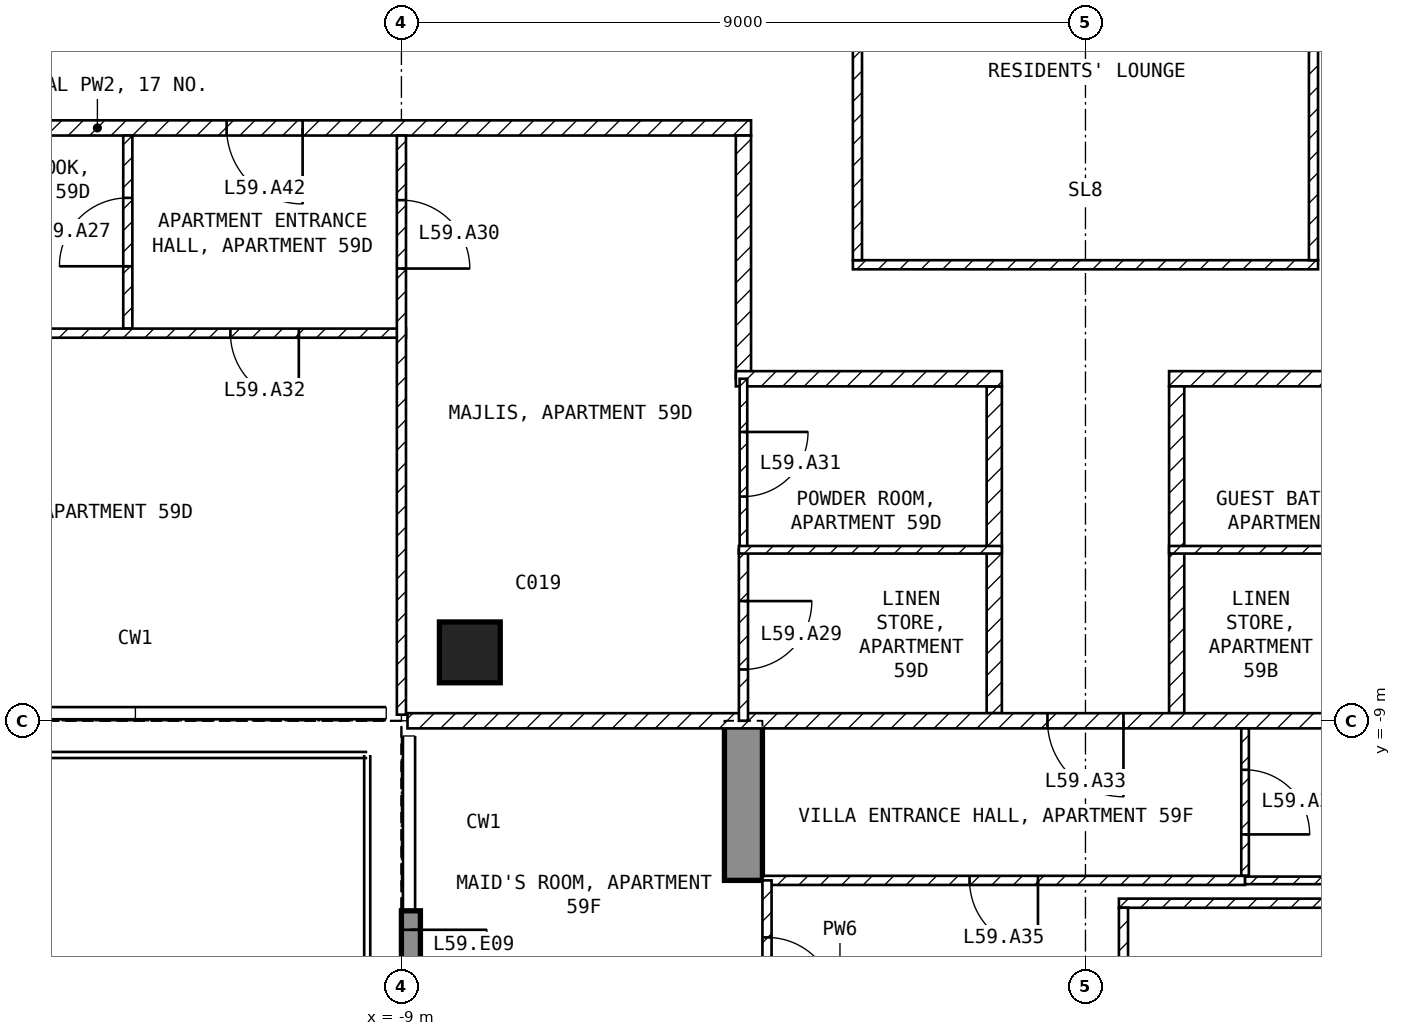
"""IFC4 building model, lengths in metres.
Left out: names, types, materials, properties, quantities, classifications, styles, units other than length and angle.
Written with IfcOpenShell. Run it as: python <this file> out.ifc"""

import sys

from ifc_helpers import new_model, si_unit, direction, frame, frame_2d, origin, origin_2d, place, context, subcontext, project, spatial, polyline, rectangle, outline, extrude, element, fill, save


model = new_model("IFC4")
c1 = context("Model", 3, precision=1e-05, world=origin(), true_north=direction((0.0, 1.0)))
c2 = subcontext(c1, "Body", "Model", "MODEL_VIEW")
j1 = project(units=[si_unit("LENGTHUNIT", "METRE"), si_unit("PLANEANGLEUNIT", "RADIAN")], contexts=[c1])
p1 = place(None, origin())
s1 = spatial("IfcSite", under=j1, at=p1, CompositionType="ELEMENT")
p2 = place(p1, origin())
s2 = spatial("IfcBuilding", under=s1, at=p2, CompositionType="ELEMENT")
p3 = place(p2, frame((0.0, 0.0, 236.0)))
s3 = spatial("IfcBuildingStorey", under=s2, at=p3, CompositionType="ELEMENT", Elevation=236.0)
p4 = place(p3, frame((-8.1, -8.1, -0.25), z_axis=(0.0, 0.0, 1.0), x_axis=(1.0, 0.0, 0.0)))
e1 = element("IfcColumn", 1, at=p4, inside=s3, PredefinedType="COLUMN", context=c2, shape_type="SweptSolid", body=[
    extrude(rectangle(XDim=0.8, YDim=0.8, at=origin_2d()), origin(), (0.0, 0.0, 1.0), 3.5),
])
p5 = place(p3, frame((-4.75, -16.7, -0.25), z_axis=(1.0, 0.0, 0.0), x_axis=(0.0, 1.0, 0.0)))
e2 = element("IfcWall", 2, at=p5, inside=s3, PredefinedType="SHEAR", context=c2, shape_type="SweptSolid", body=[
    extrude(outline(polyline([(0.0, 0.0), (3.2, 0.0), (3.2, 2.65), (5.6, 2.65), (5.6, 0.0), (7.7, 0.0), (7.7, 3.5), (0.0, 3.5), (0.0, 0.0)])), origin(), (0.0, 0.0, 1.0), 0.5),
])
p6 = place(p3, frame((-8.875, -11.5, 0.0), z_axis=(0.0, 0.0, 1.0), x_axis=(0.0, -1.0, 0.0)))
e3 = element("IfcWall", 3, at=p6, inside=s3, PredefinedType="SOLIDWALL", context=c2, shape_type="SweptSolid", body=[
    extrude(rectangle(XDim=2.7, YDim=0.25, at=frame_2d((1.35, 0.0))), origin(), (0.0, 0.0, 1.0), 3.25),
])
p7 = place(p6, frame((0.25, 0.0, 0.0)))
e4 = element("IfcOpeningElement", 4, at=p7, cuts=e3, PredefinedType="OPENING", context=c2, shape_type="SweptSolid", body=[
    extrude(rectangle(XDim=1.0, YDim=2.4, at=frame_2d((0.5, 1.2))), frame((0.0, 0.135, 0.0), z_axis=(0.0, -1.0, 0.0), x_axis=(1.0, 0.0, 0.0)), (0.0, 0.0, 1.0), 0.27),
])
p8 = place(p3, frame((-3.06, -3.0, 0.0), z_axis=(0.0, 0.0, 1.0), x_axis=(1.0, 0.0, 0.0)))
e5 = element("IfcWall", 5, at=p8, inside=s3, PredefinedType="PARTITIONING", context=c2, shape_type="SweptSolid", body=[
    extrude(rectangle(XDim=6.12, YDim=0.12, at=frame_2d((3.06, 0.0))), origin(), (0.0, 0.0, 1.0), 3.25),
])
for number, where, z_axis, x_axis in (
    (6, (3.0, -2.94, 0.0), (0.0, 0.0, 1.0), (0.0, 1.0, 0.0)),
    (7, (-3.0, 2.94, 0.0), (0.0, 0.0, 1.0), (0.0, -1.0, 0.0)),
):
    element("IfcWall", number, at=place(p3, frame(where, z_axis=z_axis, x_axis=x_axis)), inside=s3, PredefinedType="PARTITIONING", context=c2, shape_type="SweptSolid", body=[
        extrude(rectangle(XDim=5.88, YDim=0.12, at=frame_2d((2.94, 0.0))), origin(), (0.0, 0.0, 1.0), 3.25),
    ])
p9 = place(p3, frame((4.6, -4.5, 0.0), z_axis=(0.0, 0.0, 1.0), x_axis=(-1.0, 0.0, 0.0)))
e8 = element("IfcWall", 8, at=p9, inside=s3, PredefinedType="PARTITIONING", context=c2, shape_type="SweptSolid", body=[
    extrude(rectangle(XDim=3.5, YDim=0.2, at=frame_2d((1.75, 0.0))), origin(), (0.0, 0.0, 1.0), 3.25),
])
p10 = place(p3, frame((1.2, -4.6, 0.0), z_axis=(0.0, 0.0, 1.0), x_axis=(0.0, -1.0, 0.0)))
e9 = element("IfcWall", 9, at=p10, inside=s3, PredefinedType="PARTITIONING", context=c2, shape_type="SweptSolid", body=[
    extrude(rectangle(XDim=4.3, YDim=0.2, at=frame_2d((2.15, 0.0))), origin(), (0.0, 0.0, 1.0), 3.25),
])
p11 = place(p3, frame((-4.4, -1.2, 0.0), z_axis=(0.0, 0.0, 1.0), x_axis=(-1.0, 0.0, 0.0)))
e10 = element("IfcWall", 10, at=p11, inside=s3, PredefinedType="PARTITIONING", context=c2, shape_type="SweptSolid", body=[
    extrude(rectangle(XDim=17.2, YDim=0.2, at=frame_2d((8.6, 0.0))), origin(), (0.0, 0.0, 1.0), 3.25),
])
p12 = place(p11, frame((5.9, 0.0, 0.0)))
e11 = element("IfcOpeningElement", 11, at=p12, cuts=e10, PredefinedType="OPENING", context=c2, shape_type="SweptSolid", body=[
    extrude(rectangle(XDim=1.0, YDim=2.1, at=frame_2d((0.5, 1.05))), frame((0.0, 0.11, 0.0), z_axis=(0.0, -1.0, 0.0), x_axis=(1.0, 0.0, 0.0)), (0.0, 0.0, 1.0), 0.22),
])
p13 = place(p3, frame((-4.5, -4.5, 0.0), z_axis=(0.0, 0.0, 1.0), x_axis=(0.0, 1.0, 0.0)))
e12 = element("IfcWall", 12, at=p13, inside=s3, PredefinedType="PARTITIONING", context=c2, shape_type="SweptSolid", body=[
    extrude(rectangle(XDim=3.2, YDim=0.2, at=frame_2d((1.6, 0.0))), origin(), (0.0, 0.0, 1.0), 3.25),
])
p14 = place(p3, frame((-1.2, -8.9, 0.0), z_axis=(0.0, 0.0, 1.0), x_axis=(0.0, 1.0, 0.0)))
e13 = element("IfcWall", 13, at=p14, inside=s3, PredefinedType="PARTITIONING", context=c2, shape_type="SweptSolid", body=[
    extrude(rectangle(XDim=4.3, YDim=0.2, at=frame_2d((2.15, 0.0))), origin(), (0.0, 0.0, 1.0), 3.25),
])
p15 = place(p3, frame((-1.1, -4.5, 0.0), z_axis=(0.0, 0.0, 1.0), x_axis=(-1.0, 0.0, 0.0)))
e14 = element("IfcWall", 14, at=p15, inside=s3, PredefinedType="PARTITIONING", context=c2, shape_type="SweptSolid", body=[
    extrude(rectangle(XDim=3.5, YDim=0.2, at=frame_2d((1.75, 0.0))), origin(), (0.0, 0.0, 1.0), 3.25),
])
p16 = place(p3, frame((8.92, -9.0, 0.0), z_axis=(0.0, 0.0, 1.0), x_axis=(-1.0, 0.0, 0.0)))
e15 = element("IfcWall", 15, at=p16, inside=s3, PredefinedType="PARTITIONING", context=c2, shape_type="SweptSolid", body=[
    extrude(rectangle(XDim=17.84, YDim=0.2, at=frame_2d((8.92, 0.0))), origin(), (0.0, 0.0, 1.0), 3.25),
])
p17 = place(p16, frame((8.42, 0.0, 0.0)))
e16 = element("IfcOpeningElement", 16, at=p17, cuts=e15, PredefinedType="OPENING", context=c2, shape_type="SweptSolid", body=[
    extrude(rectangle(XDim=1.0, YDim=2.1, at=frame_2d((0.5, 1.05))), frame((0.0, 0.11, 0.0), z_axis=(0.0, -1.0, 0.0), x_axis=(1.0, 0.0, 0.0)), (0.0, 0.0, 1.0), 0.22),
])
p18 = place(p3, frame((4.56, -6.75, 0.0), z_axis=(0.0, 0.0, 1.0), x_axis=(-1.0, 0.0, 0.0)))
e17 = element("IfcWall", 17, at=p18, inside=s3, PredefinedType="PARTITIONING", context=c2, shape_type="SweptSolid", body=[
    extrude(rectangle(XDim=3.46, YDim=0.1, at=frame_2d((1.73, 0.0))), origin(), (0.0, 0.0, 1.0), 3.25),
])
p19 = place(p3, frame((-12.6, -3.84, 0.0), z_axis=(0.0, 0.0, 1.0), x_axis=(0.0, 1.0, 0.0)))
e18 = element("IfcWall", 18, at=p19, inside=s3, PredefinedType="PARTITIONING", context=c2, shape_type="SweptSolid", body=[
    extrude(rectangle(XDim=2.54, YDim=0.12, at=frame_2d((1.27, 0.0))), origin(), (0.0, 0.0, 1.0), 3.25),
])
p20 = place(p19, frame((0.82, 0.0, 0.0)))
e19 = element("IfcOpeningElement", 19, at=p20, cuts=e18, PredefinedType="OPENING", context=c2, shape_type="SweptSolid", body=[
    extrude(rectangle(XDim=0.9, YDim=2.1, at=frame_2d((0.45, 1.05))), frame((0.0, 0.07, 0.0), z_axis=(0.0, -1.0, 0.0), x_axis=(1.0, 0.0, 0.0)), (0.0, 0.0, 1.0), 0.14),
])
p21 = place(p3, frame((-8.94, -3.9, 0.0), z_axis=(0.0, 0.0, 1.0), x_axis=(-1.0, 0.0, 0.0)))
e20 = element("IfcWall", 20, at=p21, inside=s3, PredefinedType="PARTITIONING", context=c2, shape_type="SweptSolid", body=[
    extrude(rectangle(XDim=8.46, YDim=0.12, at=frame_2d((4.23, 0.0))), origin(), (0.0, 0.0, 1.0), 3.25),
])
p22 = place(p21, frame((7.11, 0.0, 0.0)))
e21 = element("IfcOpeningElement", 21, at=p22, cuts=e20, PredefinedType="OPENING", context=c2, shape_type="SweptSolid", body=[
    extrude(rectangle(XDim=0.9, YDim=2.1, at=frame_2d((0.45, 1.05))), frame((0.0, 0.07, 0.0), z_axis=(0.0, -1.0, 0.0), x_axis=(1.0, 0.0, 0.0)), (0.0, 0.0, 1.0), 0.14),
])
p23 = place(p21, frame((1.41, 0.0, 0.0)))
e22 = element("IfcOpeningElement", 22, at=p23, cuts=e20, PredefinedType="OPENING", context=c2, shape_type="SweptSolid", body=[
    extrude(rectangle(XDim=0.9, YDim=2.1, at=frame_2d((0.45, 1.05))), frame((0.0, 0.07, 0.0), z_axis=(0.0, -1.0, 0.0), x_axis=(1.0, 0.0, 0.0)), (0.0, 0.0, 1.0), 0.14),
])
p24 = place(p3, frame((-9.0, -1.3, 0.0), z_axis=(0.0, 0.0, 1.0), x_axis=(0.0, -1.0, 0.0)))
e23 = element("IfcWall", 23, at=p24, inside=s3, PredefinedType="PARTITIONING", context=c2, shape_type="SweptSolid", body=[
    extrude(rectangle(XDim=7.62, YDim=0.12, at=frame_2d((3.81, 0.0))), origin(), (0.0, 0.0, 1.0), 3.25),
])
p25 = place(p24, frame((0.85, 0.0, 0.0)))
e24 = element("IfcOpeningElement", 24, at=p25, cuts=e23, PredefinedType="OPENING", context=c2, shape_type="SweptSolid", body=[
    extrude(rectangle(XDim=0.9, YDim=2.1, at=frame_2d((0.45, 1.05))), frame((0.0, 0.07, 0.0), z_axis=(0.0, -1.0, 0.0), x_axis=(1.0, 0.0, 0.0)), (0.0, 0.0, 1.0), 0.14),
])
p26 = place(p3, frame((-4.5, -4.5, 0.0), z_axis=(0.0, 0.0, 1.0), x_axis=(0.0, -1.0, 0.0)))
e25 = element("IfcWall", 25, at=p26, inside=s3, PredefinedType="PARTITIONING", context=c2, shape_type="SweptSolid", body=[
    extrude(rectangle(XDim=2.25, YDim=0.1, at=frame_2d((1.125, 0.0))), origin(), (0.0, 0.0, 1.0), 3.25),
])
p27 = place(p26, frame((0.7, 0.0, 0.0)))
e26 = element("IfcOpeningElement", 26, at=p27, cuts=e25, PredefinedType="OPENING", context=c2, shape_type="SweptSolid", body=[
    extrude(rectangle(XDim=0.85, YDim=2.1, at=frame_2d((0.425, 1.05))), frame((0.0, 0.06, 0.0), z_axis=(0.0, -1.0, 0.0), x_axis=(1.0, 0.0, 0.0)), (0.0, 0.0, 1.0), 0.12),
])
p28 = place(p3, frame((-4.5, -6.75, 0.0), z_axis=(0.0, 0.0, 1.0), x_axis=(0.0, -1.0, 0.0)))
e27 = element("IfcWall", 27, at=p28, inside=s3, PredefinedType="PARTITIONING", context=c2, shape_type="SweptSolid", body=[
    extrude(rectangle(XDim=2.25, YDim=0.12, at=frame_2d((1.125, 0.0))), origin(), (0.0, 0.0, 1.0), 3.25),
])
p29 = place(p28, frame((0.675, 0.0, 0.0)))
e28 = element("IfcOpeningElement", 28, at=p29, cuts=e27, PredefinedType="OPENING", context=c2, shape_type="SweptSolid", body=[
    extrude(rectangle(XDim=0.9, YDim=2.1, at=frame_2d((0.45, 1.05))), frame((0.0, 0.07, 0.0), z_axis=(0.0, -1.0, 0.0), x_axis=(1.0, 0.0, 0.0)), (0.0, 0.0, 1.0), 0.14),
])
p30 = place(p3, frame((-1.1, -6.75, 0.0), z_axis=(0.0, 0.0, 1.0), x_axis=(-1.0, 0.0, 0.0)))
e29 = element("IfcWall", 29, at=p30, inside=s3, PredefinedType="PARTITIONING", context=c2, shape_type="SweptSolid", body=[
    extrude(rectangle(XDim=3.46, YDim=0.1, at=frame_2d((1.73, 0.0))), origin(), (0.0, 0.0, 1.0), 3.25),
])
p31 = place(p3, frame((2.1, -9.1, 0.0), z_axis=(0.0, 0.0, 1.0), x_axis=(0.0, -1.0, 0.0)))
e30 = element("IfcWall", 30, at=p31, inside=s3, PredefinedType="PARTITIONING", context=c2, shape_type="SweptSolid", body=[
    extrude(rectangle(XDim=1.94, YDim=0.1, at=frame_2d((0.97, 0.0))), origin(), (0.0, 0.0, 1.0), 3.25),
])
p32 = place(p31, frame((0.545, 0.0, 0.0)))
e31 = element("IfcOpeningElement", 31, at=p32, cuts=e30, PredefinedType="OPENING", context=c2, shape_type="SweptSolid", body=[
    extrude(rectangle(XDim=0.85, YDim=2.1, at=frame_2d((0.425, 1.05))), frame((0.0, 0.06, 0.0), z_axis=(0.0, -1.0, 0.0), x_axis=(1.0, 0.0, 0.0)), (0.0, 0.0, 1.0), 0.12),
])
p33 = place(p3, frame((2.1, -11.1, 0.0), z_axis=(0.0, 0.0, 1.0), x_axis=(-1.0, 0.0, 0.0)))
e32 = element("IfcWall", 32, at=p33, inside=s3, PredefinedType="PARTITIONING", context=c2, shape_type="SweptSolid", body=[
    extrude(rectangle(XDim=6.35, YDim=0.12, at=frame_2d((3.175, 0.0))), origin(), (0.0, 0.0, 1.0), 3.25),
])
p34 = place(p33, frame((2.725, 0.0, 0.0)))
e33 = element("IfcOpeningElement", 33, at=p34, cuts=e32, PredefinedType="OPENING", context=c2, shape_type="SweptSolid", body=[
    extrude(rectangle(XDim=0.9, YDim=2.1, at=frame_2d((0.45, 1.05))), frame((0.0, 0.07, 0.0), z_axis=(0.0, -1.0, 0.0), x_axis=(1.0, 0.0, 0.0)), (0.0, 0.0, 1.0), 0.14),
])
p35 = place(p3, frame((4.25, -11.1, 0.0), z_axis=(0.0, 0.0, 1.0), x_axis=(-1.0, 0.0, 0.0)))
e34 = element("IfcWall", 34, at=p35, inside=s3, PredefinedType="PARTITIONING", context=c2, shape_type="SweptSolid", body=[
    extrude(rectangle(XDim=2.15, YDim=0.1, at=frame_2d((1.075, 0.0))), origin(), (0.0, 0.0, 1.0), 3.25),
])
p36 = place(p3, frame((4.25, -11.4, 0.0), z_axis=(0.0, 0.0, 1.0), x_axis=(-1.0, 0.0, 0.0)))
e35 = element("IfcWall", 35, at=p36, inside=s3, PredefinedType="PARTITIONING", context=c2, shape_type="SweptSolid", body=[
    extrude(rectangle(XDim=3.81, YDim=0.12, at=frame_2d((1.905, 0.0))), origin(), (0.0, 0.0, 1.0), 3.25),
])
p37 = place(p3, frame((0.5, -11.46, 0.0), z_axis=(0.0, 0.0, 1.0), x_axis=(0.0, -1.0, 0.0)))
e36 = element("IfcWall", 36, at=p37, inside=s3, PredefinedType="PARTITIONING", context=c2, shape_type="SweptSolid", body=[
    extrude(rectangle(XDim=2.88, YDim=0.12, at=frame_2d((1.44, 0.0))), origin(), (0.0, 0.0, 1.0), 3.25),
])
p38 = place(p37, frame((0.99, 0.0, 0.0)))
e37 = element("IfcOpeningElement", 37, at=p38, cuts=e36, PredefinedType="OPENING", context=c2, shape_type="SweptSolid", body=[
    extrude(rectangle(XDim=0.9, YDim=2.1, at=frame_2d((0.45, 1.05))), frame((0.0, 0.07, 0.0), z_axis=(0.0, -1.0, 0.0), x_axis=(1.0, 0.0, 0.0)), (0.0, 0.0, 1.0), 0.14),
])
p39 = place(p3, frame((-4.19, -11.1, 0.0), z_axis=(0.0, 0.0, 1.0), x_axis=(0.0, -1.0, 0.0)))
e38 = element("IfcWall", 38, at=p39, inside=s3, PredefinedType="PARTITIONING", context=c2, shape_type="SweptSolid", body=[
    extrude(rectangle(XDim=2.4, YDim=0.12, at=frame_2d((1.2, 0.0))), origin(), (0.0, 0.0, 1.0), 2.4),
])
p40 = place(p39, frame((0.75, 0.0, 0.0)))
e39 = element("IfcOpeningElement", 39, at=p40, cuts=e38, PredefinedType="OPENING", context=c2, shape_type="SweptSolid", body=[
    extrude(rectangle(XDim=0.9, YDim=2.1, at=frame_2d((0.45, 1.05))), frame((0.0, 0.07, 0.0), z_axis=(0.0, -1.0, 0.0), x_axis=(1.0, 0.0, 0.0)), (0.0, 0.0, 1.0), 0.14),
])
p41 = place(p7, origin())
e40 = element("IfcDoor", 40, at=p41, inside=s3, OperationType="SINGLE_SWING_LEFT", PredefinedType="DOOR", context=c2, shape_type="SweptSolid", body=[
    extrude(rectangle(XDim=1.0, YDim=2.4, at=frame_2d((0.5, 1.2))), frame((0.0, 0.025, 0.0), z_axis=(0.0, -1.0, 0.0), x_axis=(1.0, 0.0, 0.0)), (0.0, 0.0, 1.0), 0.05),
])
fill(e4, e40)
p42 = place(p20, origin())
e41 = element("IfcDoor", 41, at=p42, inside=s3, OperationType="SINGLE_SWING_LEFT", PredefinedType="DOOR", context=c2, shape_type="SweptSolid", body=[
    extrude(rectangle(XDim=0.9, YDim=2.1, at=frame_2d((0.45, 1.05))), frame((0.0, 0.025, 0.0), z_axis=(0.0, -1.0, 0.0), x_axis=(1.0, 0.0, 0.0)), (0.0, 0.0, 1.0), 0.05),
])
fill(e19, e41)
p43 = place(p29, origin())
e42 = element("IfcDoor", 42, at=p43, inside=s3, OperationType="SINGLE_SWING_LEFT", PredefinedType="DOOR", context=c2, shape_type="SweptSolid", body=[
    extrude(rectangle(XDim=0.9, YDim=2.1, at=frame_2d((0.45, 1.05))), frame((0.0, 0.025, 0.0), z_axis=(0.0, -1.0, 0.0), x_axis=(1.0, 0.0, 0.0)), (0.0, 0.0, 1.0), 0.05),
])
fill(e28, e42)
p44 = place(p25, origin())
e43 = element("IfcDoor", 43, at=p44, inside=s3, OperationType="SINGLE_SWING_RIGHT", PredefinedType="DOOR", context=c2, shape_type="SweptSolid", body=[
    extrude(rectangle(XDim=0.9, YDim=2.1, at=frame_2d((0.45, 1.05))), frame((0.0, 0.025, 0.0), z_axis=(0.0, -1.0, 0.0), x_axis=(1.0, 0.0, 0.0)), (0.0, 0.0, 1.0), 0.05),
])
fill(e24, e43)
p45 = place(p27, origin())
e44 = element("IfcDoor", 44, at=p45, inside=s3, OperationType="SINGLE_SWING_LEFT", PredefinedType="DOOR", context=c2, shape_type="SweptSolid", body=[
    extrude(rectangle(XDim=0.85, YDim=2.1, at=frame_2d((0.425, 1.05))), frame((0.0, 0.025, 0.0), z_axis=(0.0, -1.0, 0.0), x_axis=(1.0, 0.0, 0.0)), (0.0, 0.0, 1.0), 0.05),
])
fill(e26, e44)
p46 = place(p23, origin())
e45 = element("IfcDoor", 45, at=p46, inside=s3, OperationType="SINGLE_SWING_LEFT", PredefinedType="DOOR", context=c2, shape_type="SweptSolid", body=[
    extrude(rectangle(XDim=0.9, YDim=2.1, at=frame_2d((0.45, 1.05))), frame((0.0, 0.025, 0.0), z_axis=(0.0, -1.0, 0.0), x_axis=(1.0, 0.0, 0.0)), (0.0, 0.0, 1.0), 0.05),
])
fill(e22, e45)
p47 = place(p17, origin())
e46 = element("IfcDoor", 46, at=p47, inside=s3, OperationType="SINGLE_SWING_LEFT", PredefinedType="DOOR", context=c2, shape_type="SweptSolid", body=[
    extrude(rectangle(XDim=1.0, YDim=2.1, at=frame_2d((0.5, 1.05))), frame((0.0, 0.025, 0.0), z_axis=(0.0, -1.0, 0.0), x_axis=(1.0, 0.0, 0.0)), (0.0, 0.0, 1.0), 0.05),
])
fill(e16, e46)
p48 = place(p32, origin())
e47 = element("IfcDoor", 47, at=p48, inside=s3, OperationType="SINGLE_SWING_RIGHT", PredefinedType="DOOR", context=c2, shape_type="SweptSolid", body=[
    extrude(rectangle(XDim=0.85, YDim=2.1, at=frame_2d((0.425, 1.05))), frame((0.0, 0.025, 0.0), z_axis=(0.0, -1.0, 0.0), x_axis=(1.0, 0.0, 0.0)), (0.0, 0.0, 1.0), 0.05),
])
fill(e31, e47)
p49 = place(p34, origin())
e48 = element("IfcDoor", 48, at=p49, inside=s3, OperationType="SINGLE_SWING_LEFT", PredefinedType="DOOR", context=c2, shape_type="SweptSolid", body=[
    extrude(rectangle(XDim=0.9, YDim=2.1, at=frame_2d((0.45, 1.05))), frame((0.0, 0.025, 0.0), z_axis=(0.0, -1.0, 0.0), x_axis=(1.0, 0.0, 0.0)), (0.0, 0.0, 1.0), 0.05),
])
fill(e33, e48)
p50 = place(p12, origin())
e49 = element("IfcDoor", 49, at=p50, inside=s3, OperationType="SINGLE_SWING_LEFT", PredefinedType="DOOR", context=c2, shape_type="SweptSolid", body=[
    extrude(rectangle(XDim=1.0, YDim=2.1, at=frame_2d((0.5, 1.05))), frame((0.0, 0.025, 0.0), z_axis=(0.0, -1.0, 0.0), x_axis=(1.0, 0.0, 0.0)), (0.0, 0.0, 1.0), 0.05),
])
fill(e11, e49)
p51 = place(p40, origin())
e50 = element("IfcDoor", 50, at=p51, inside=s3, OperationType="SINGLE_SWING_RIGHT", PredefinedType="DOOR", context=c2, shape_type="SweptSolid", body=[
    extrude(rectangle(XDim=0.9, YDim=2.1, at=frame_2d((0.45, 1.05))), frame((0.0, 0.025, 0.0), z_axis=(0.0, -1.0, 0.0), x_axis=(1.0, 0.0, 0.0)), (0.0, 0.0, 1.0), 0.05),
])
fill(e39, e50)
save(model, sys.argv[1])
